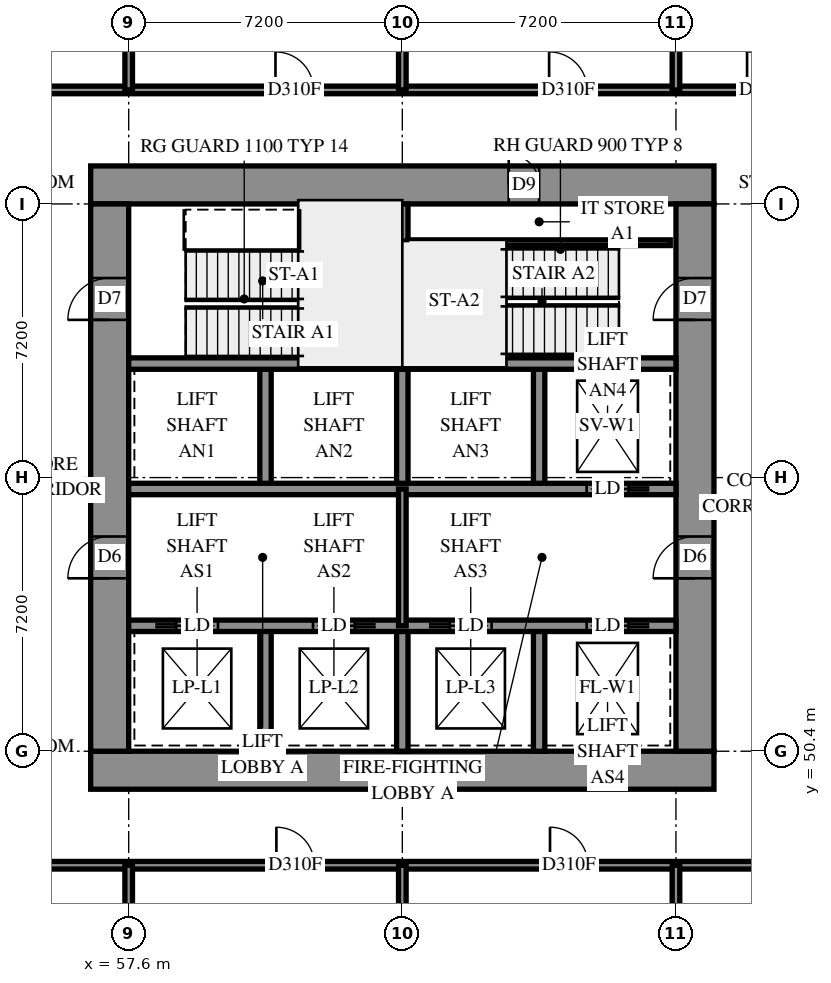
"""IFC4 building model, lengths in metres.
Left out: names, types, materials, properties, quantities, classifications, styles, units other than length and angle.
Written with IfcOpenShell. Run it as: python <this file> out.ifc"""

import sys

from ifc_helpers import new_model, si_unit, direction, frame, frame_2d, origin, place, context, subcontext, project, spatial, rectangle, extrude, element, fill, save


model = new_model("IFC4")
c1 = context("Model", 3, precision=1e-05, world=origin(), true_north=direction((0.0, 1.0)))
c2 = subcontext(c1, "Body", "Model", "MODEL_VIEW")
j1 = project(units=[si_unit("LENGTHUNIT", "METRE"), si_unit("PLANEANGLEUNIT", "RADIAN")], contexts=[c1])
p1 = place(None, origin())
s1 = spatial("IfcSite", under=j1, at=p1, CompositionType="ELEMENT")
p2 = place(p1, origin())
s2 = spatial("IfcBuilding", under=s1, at=p2, CompositionType="ELEMENT")
p3 = place(p2, frame((0.0, 0.0, 22.8)))
s3 = spatial("IfcBuildingStorey", under=s2, at=p3, CompositionType="ELEMENT", Elevation=22.8)
p4 = place(p3, frame((56.6, 49.9, -0.4), z_axis=(0.0, 0.0, 1.0), x_axis=(1.0, 0.0, 0.0)))
e1 = element("IfcWall", 1, at=p4, inside=s3, PredefinedType="SHEAR", context=c2, shape_type="SweptSolid", body=[
    extrude(rectangle(XDim=16.4, YDim=1.0, at=frame_2d((8.2, 0.0))), origin(), (0.0, 0.0, 1.0), 3.6),
])
p5 = place(p3, frame((56.6, 65.3, -0.4), z_axis=(0.0, 0.0, 1.0), x_axis=(1.0, 0.0, 0.0)))
e2 = element("IfcWall", 2, at=p5, inside=s3, PredefinedType="SHEAR", context=c2, shape_type="SweptSolid", body=[
    extrude(rectangle(XDim=16.4, YDim=1.0, at=frame_2d((8.2, 0.0))), origin(), (0.0, 0.0, 1.0), 3.6),
])
p6 = place(p5, frame((11.0, 0.0, 0.4)))
e3 = element("IfcOpeningElement", 3, at=p6, cuts=e2, PredefinedType="OPENING", context=c2, shape_type="SweptSolid", body=[
    extrude(rectangle(XDim=0.8, YDim=2.1, at=frame_2d((0.4, 1.05))), frame((0.0, 0.51, 0.0), z_axis=(0.0, -1.0, 0.0), x_axis=(1.0, 0.0, 0.0)), (0.0, 0.0, 1.0), 1.02),
])
p7 = place(p3, frame((57.1, 50.4, -0.4), z_axis=(0.0, 0.0, 1.0), x_axis=(0.0, 1.0, 0.0)))
e4 = element("IfcWall", 4, at=p7, inside=s3, PredefinedType="SHEAR", context=c2, shape_type="SweptSolid", body=[
    extrude(rectangle(XDim=14.4, YDim=1.0, at=frame_2d((7.2, 0.0))), origin(), (0.0, 0.0, 1.0), 3.6),
])
p8 = place(p7, frame((4.55, 0.0, 0.4)))
e5 = element("IfcOpeningElement", 5, at=p8, cuts=e4, PredefinedType="OPENING", context=c2, shape_type="SweptSolid", body=[
    extrude(rectangle(XDim=1.1, YDim=2.1, at=frame_2d((0.55, 1.05))), frame((0.0, 0.51, 0.0), z_axis=(0.0, -1.0, 0.0), x_axis=(1.0, 0.0, 0.0)), (0.0, 0.0, 1.0), 1.02),
])
p9 = place(p7, frame((11.35, 0.0, 0.4)))
e6 = element("IfcOpeningElement", 6, at=p9, cuts=e4, PredefinedType="OPENING", context=c2, shape_type="SweptSolid", body=[
    extrude(rectangle(XDim=1.1, YDim=2.1, at=frame_2d((0.55, 1.05))), frame((0.0, 0.51, 0.0), z_axis=(0.0, -1.0, 0.0), x_axis=(1.0, 0.0, 0.0)), (0.0, 0.0, 1.0), 1.02),
])
p10 = place(p3, frame((72.5, 50.4, -0.4), z_axis=(0.0, 0.0, 1.0), x_axis=(0.0, 1.0, 0.0)))
e7 = element("IfcWall", 7, at=p10, inside=s3, PredefinedType="SHEAR", context=c2, shape_type="SweptSolid", body=[
    extrude(rectangle(XDim=14.4, YDim=1.0, at=frame_2d((7.2, 0.0))), origin(), (0.0, 0.0, 1.0), 3.6),
])
p11 = place(p10, frame((4.55, 0.0, 0.4)))
e8 = element("IfcOpeningElement", 8, at=p11, cuts=e7, PredefinedType="OPENING", context=c2, shape_type="SweptSolid", body=[
    extrude(rectangle(XDim=1.1, YDim=2.1, at=frame_2d((0.55, 1.05))), frame((0.0, 0.51, 0.0), z_axis=(0.0, -1.0, 0.0), x_axis=(1.0, 0.0, 0.0)), (0.0, 0.0, 1.0), 1.02),
])
p12 = place(p10, frame((11.35, 0.0, 0.4)))
e9 = element("IfcOpeningElement", 9, at=p12, cuts=e7, PredefinedType="OPENING", context=c2, shape_type="SweptSolid", body=[
    extrude(rectangle(XDim=1.1, YDim=2.1, at=frame_2d((0.55, 1.05))), frame((0.0, 0.51, 0.0), z_axis=(0.0, -1.0, 0.0), x_axis=(1.0, 0.0, 0.0)), (0.0, 0.0, 1.0), 1.02),
])
for number, where, z_axis, x_axis in (
    (10, (61.2, 50.4, 0.0), (0.0, 0.0, 1.0), (0.0, 1.0, 0.0)),
    (11, (61.2, 57.3, 0.0), (0.0, 0.0, 1.0), (0.0, 1.0, 0.0)),
    (12, (64.8, 50.4, 0.0), (0.0, 0.0, 1.0), (0.0, 1.0, 0.0)),
    (13, (64.8, 57.3, 0.0), (0.0, 0.0, 1.0), (0.0, 1.0, 0.0)),
    (14, (68.4, 50.4, 0.0), (0.0, 0.0, 1.0), (0.0, 1.0, 0.0)),
    (15, (68.4, 57.3, 0.0), (0.0, 0.0, 1.0), (0.0, 1.0, 0.0)),
):
    element("IfcWall", number, at=place(p3, frame(where, z_axis=z_axis, x_axis=x_axis)), inside=s3, PredefinedType="SOLIDWALL", context=c2, shape_type="SweptSolid", body=[
        extrude(rectangle(XDim=3.3, YDim=0.3, at=frame_2d((1.65, 0.0))), origin(), (0.0, 0.0, 1.0), 3.9),
    ])
p13 = place(p3, frame((57.6, 53.7, 0.0), z_axis=(0.0, 0.0, 1.0), x_axis=(1.0, 0.0, 0.0)))
e16 = element("IfcWall", 16, at=p13, inside=s3, PredefinedType="SOLIDWALL", context=c2, shape_type="SweptSolid", body=[
    extrude(rectangle(XDim=14.4, YDim=0.3, at=frame_2d((7.2, 0.0))), origin(), (0.0, 0.0, 1.0), 3.9),
])
p14 = place(p13, frame((1.25, 0.0, 0.0)))
e17 = element("IfcOpeningElement", 17, at=p14, cuts=e16, PredefinedType="OPENING", context=c2, shape_type="SweptSolid", body=[
    extrude(rectangle(XDim=1.1, YDim=2.1, at=frame_2d((0.55, 1.05))), frame((0.0, 0.16, 0.0), z_axis=(0.0, -1.0, 0.0), x_axis=(1.0, 0.0, 0.0)), (0.0, 0.0, 1.0), 0.32),
])
p15 = place(p13, frame((4.85, 0.0, 0.0)))
e18 = element("IfcOpeningElement", 18, at=p15, cuts=e16, PredefinedType="OPENING", context=c2, shape_type="SweptSolid", body=[
    extrude(rectangle(XDim=1.1, YDim=2.1, at=frame_2d((0.55, 1.05))), frame((0.0, 0.16, 0.0), z_axis=(0.0, -1.0, 0.0), x_axis=(1.0, 0.0, 0.0)), (0.0, 0.0, 1.0), 0.32),
])
p16 = place(p13, frame((8.45, 0.0, 0.0)))
e19 = element("IfcOpeningElement", 19, at=p16, cuts=e16, PredefinedType="OPENING", context=c2, shape_type="SweptSolid", body=[
    extrude(rectangle(XDim=1.1, YDim=2.1, at=frame_2d((0.55, 1.05))), frame((0.0, 0.16, 0.0), z_axis=(0.0, -1.0, 0.0), x_axis=(1.0, 0.0, 0.0)), (0.0, 0.0, 1.0), 0.32),
])
p17 = place(p13, frame((12.05, 0.0, 0.0)))
e20 = element("IfcOpeningElement", 20, at=p17, cuts=e16, PredefinedType="OPENING", context=c2, shape_type="SweptSolid", body=[
    extrude(rectangle(XDim=1.1, YDim=2.1, at=frame_2d((0.55, 1.05))), frame((0.0, 0.16, 0.0), z_axis=(0.0, -1.0, 0.0), x_axis=(1.0, 0.0, 0.0)), (0.0, 0.0, 1.0), 0.32),
])
p18 = place(p3, frame((57.6, 57.3, 0.0), z_axis=(0.0, 0.0, 1.0), x_axis=(1.0, 0.0, 0.0)))
e21 = element("IfcWall", 21, at=p18, inside=s3, PredefinedType="SOLIDWALL", context=c2, shape_type="SweptSolid", body=[
    extrude(rectangle(XDim=14.4, YDim=0.3, at=frame_2d((7.2, 0.0))), origin(), (0.0, 0.0, 1.0), 3.9),
])
p19 = place(p18, frame((12.05, 0.0, 0.0)))
e22 = element("IfcOpeningElement", 22, at=p19, cuts=e21, PredefinedType="OPENING", context=c2, shape_type="SweptSolid", body=[
    extrude(rectangle(XDim=1.1, YDim=2.1, at=frame_2d((0.55, 1.05))), frame((0.0, 0.16, 0.0), z_axis=(0.0, -1.0, 0.0), x_axis=(1.0, 0.0, 0.0)), (0.0, 0.0, 1.0), 0.32),
])
for number, where, z_axis, x_axis in (
    (23, (57.6, 60.6, 0.0), (0.0, 0.0, 1.0), (1.0, 0.0, 0.0)),
    (24, (64.8, 60.6, 0.0), (0.0, 0.0, 1.0), (1.0, 0.0, 0.0)),
):
    element("IfcWall", number, at=place(p3, frame(where, z_axis=z_axis, x_axis=x_axis)), inside=s3, PredefinedType="SOLIDWALL", context=c2, shape_type="SweptSolid", body=[
        extrude(rectangle(XDim=7.2, YDim=0.3, at=frame_2d((3.6, 0.0))), origin(), (0.0, 0.0, 1.0), 3.9),
    ])
p20 = place(p3, frame((64.8, 60.6, 0.0), z_axis=(0.0, 0.0, 1.0), x_axis=(0.0, 1.0, 0.0)))
e25 = element("IfcWall", 25, at=p20, inside=s3, PredefinedType="SOLIDWALL", context=c2, shape_type="SweptSolid", body=[
    extrude(rectangle(XDim=4.2, YDim=0.3, at=frame_2d((2.1, 0.0))), origin(), (0.0, 0.0, 1.0), 3.9),
])
p21 = place(p3, frame((64.95, 63.78, 0.0), z_axis=(0.0, 0.0, 1.0), x_axis=(1.0, 0.0, 0.0)))
e26 = element("IfcWall", 26, at=p21, inside=s3, PredefinedType="PARTITIONING", context=c2, shape_type="SweptSolid", body=[
    extrude(rectangle(XDim=6.9, YDim=0.15, at=frame_2d((3.45, 0.0))), origin(), (0.0, 0.0, 1.0), 3.9),
])
p22 = place(p3, frame((64.8, 53.7, 0.0), z_axis=(0.0, 0.0, 1.0), x_axis=(0.0, 1.0, 0.0)))
e27 = element("IfcWall", 27, at=p22, inside=s3, PredefinedType="PARTITIONING", context=c2, shape_type="SweptSolid", body=[
    extrude(rectangle(XDim=3.6, YDim=0.2, at=frame_2d((1.8, 0.0))), origin(), (0.0, 0.0, 1.0), 3.9),
])
p23 = place(p3, frame((54.6, 67.8, 0.0), z_axis=(0.0, 0.0, 1.0), x_axis=(1.0, 0.0, 0.0)))
e28 = element("IfcWall", 28, at=p23, inside=s3, PredefinedType="PARTITIONING", context=c2, shape_type="SweptSolid", body=[
    extrude(rectangle(XDim=20.4, YDim=0.2, at=frame_2d((10.2, 0.0))), origin(), (0.0, 0.0, 1.0), 3.9),
])
p24 = place(p23, frame((19.271, 0.0, 0.0)))
e29 = element("IfcOpeningElement", 29, at=p24, cuts=e28, PredefinedType="OPENING", context=c2, shape_type="SweptSolid", body=[
    extrude(rectangle(XDim=1.0, YDim=2.1, at=frame_2d((0.5, 1.05))), frame((0.0, 0.11, 0.0), z_axis=(0.0, -1.0, 0.0), x_axis=(1.0, 0.0, 0.0)), (0.0, 0.0, 1.0), 0.22),
])
p25 = place(p23, frame((6.862, 0.0, 0.0)))
e30 = element("IfcOpeningElement", 30, at=p25, cuts=e28, PredefinedType="OPENING", context=c2, shape_type="SweptSolid", body=[
    extrude(rectangle(XDim=1.0, YDim=2.1, at=frame_2d((0.5, 1.05))), frame((0.0, 0.11, 0.0), z_axis=(0.0, -1.0, 0.0), x_axis=(1.0, 0.0, 0.0)), (0.0, 0.0, 1.0), 0.22),
])
p26 = place(p23, frame((14.062, 0.0, 0.0)))
e31 = element("IfcOpeningElement", 31, at=p26, cuts=e28, PredefinedType="OPENING", context=c2, shape_type="SweptSolid", body=[
    extrude(rectangle(XDim=1.0, YDim=2.1, at=frame_2d((0.5, 1.05))), frame((0.0, 0.11, 0.0), z_axis=(0.0, -1.0, 0.0), x_axis=(1.0, 0.0, 0.0)), (0.0, 0.0, 1.0), 0.22),
])
p27 = place(p3, frame((54.6, 47.4, 0.0), z_axis=(0.0, 0.0, 1.0), x_axis=(1.0, 0.0, 0.0)))
e32 = element("IfcWall", 32, at=p27, inside=s3, PredefinedType="PARTITIONING", context=c2, shape_type="SweptSolid", body=[
    extrude(rectangle(XDim=19.502, YDim=0.2, at=frame_2d((9.751, 0.0))), origin(), (0.0, 0.0, 1.0), 3.9),
])
p28 = place(p27, frame((6.886, 0.0, 0.0)))
e33 = element("IfcOpeningElement", 33, at=p28, cuts=e32, PredefinedType="OPENING", context=c2, shape_type="SweptSolid", body=[
    extrude(rectangle(XDim=1.0, YDim=2.1, at=frame_2d((0.5, 1.05))), frame((0.0, 0.11, 0.0), z_axis=(0.0, -1.0, 0.0), x_axis=(1.0, 0.0, 0.0)), (0.0, 0.0, 1.0), 0.22),
])
p29 = place(p27, frame((14.086, 0.0, 0.0)))
e34 = element("IfcOpeningElement", 34, at=p29, cuts=e32, PredefinedType="OPENING", context=c2, shape_type="SweptSolid", body=[
    extrude(rectangle(XDim=1.0, YDim=2.1, at=frame_2d((0.5, 1.05))), frame((0.0, 0.11, 0.0), z_axis=(0.0, -1.0, 0.0), x_axis=(1.0, 0.0, 0.0)), (0.0, 0.0, 1.0), 0.22),
])
for number, where, z_axis, x_axis in (
    (35, (57.6, 67.8, 0.0), (0.0, 0.0, 1.0), (0.0, 1.0, 0.0)),
    (36, (64.8, 67.8, 0.0), (0.0, 0.0, 1.0), (0.0, 1.0, 0.0)),
    (37, (72.0, 67.8, 0.0), (0.0, 0.0, 1.0), (0.0, 1.0, 0.0)),
    (38, (57.6, 43.8, 0.0), (0.0, 0.0, 1.0), (0.0, 1.0, 0.0)),
    (39, (64.8, 43.8, 0.0), (0.0, 0.0, 1.0), (0.0, 1.0, 0.0)),
    (40, (72.0, 43.8, 0.0), (0.0, 0.0, 1.0), (0.0, 1.0, 0.0)),
):
    element("IfcWall", number, at=place(p3, frame(where, z_axis=z_axis, x_axis=x_axis)), inside=s3, PredefinedType="PARTITIONING", context=c2, shape_type="SweptSolid", body=[
        extrude(rectangle(XDim=3.6, YDim=0.2, at=frame_2d((1.8, 0.0))), origin(), (0.0, 0.0, 1.0), 3.9),
    ])
p30 = place(p6, origin())
e41 = element("IfcDoor", 41, at=p30, inside=s3, OperationType="SINGLE_SWING_RIGHT", PredefinedType="DOOR", context=c2, shape_type="SweptSolid", body=[
    extrude(rectangle(XDim=0.8, YDim=2.1, at=frame_2d((0.4, 1.05))), frame((0.0, -0.44, 0.0), z_axis=(0.0, -1.0, 0.0), x_axis=(1.0, 0.0, 0.0)), (0.0, 0.0, 1.0), 0.05),
])
fill(e3, e41)
p31 = place(p8, origin())
e42 = element("IfcDoor", 42, at=p31, inside=s3, OperationType="DOUBLE_DOOR_SINGLE_SWING", PredefinedType="DOOR", context=c2, shape_type="SweptSolid", body=[
    extrude(rectangle(XDim=1.1, YDim=2.1, at=frame_2d((0.55, 1.05))), frame((0.0, 0.025, 0.0), z_axis=(0.0, -1.0, 0.0), x_axis=(1.0, 0.0, 0.0)), (0.0, 0.0, 1.0), 0.05),
])
fill(e5, e42)
p32 = place(p11, origin())
e43 = element("IfcDoor", 43, at=p32, inside=s3, OperationType="DOUBLE_DOOR_SINGLE_SWING", PredefinedType="DOOR", context=c2, shape_type="SweptSolid", body=[
    extrude(rectangle(XDim=1.1, YDim=2.1, at=frame_2d((0.55, 1.05))), frame((0.0, 0.025, 0.0), z_axis=(0.0, -1.0, 0.0), x_axis=(1.0, 0.0, 0.0)), (0.0, 0.0, 1.0), 0.05),
])
fill(e8, e43)
p33 = place(p9, origin())
e44 = element("IfcDoor", 44, at=p33, inside=s3, OperationType="SINGLE_SWING_LEFT", PredefinedType="DOOR", context=c2, shape_type="SweptSolid", body=[
    extrude(rectangle(XDim=1.1, YDim=2.1, at=frame_2d((0.55, 1.05))), frame((0.0, 0.025, 0.0), z_axis=(0.0, -1.0, 0.0), x_axis=(1.0, 0.0, 0.0)), (0.0, 0.0, 1.0), 0.05),
])
fill(e6, e44)
p34 = place(p12, origin())
e45 = element("IfcDoor", 45, at=p34, inside=s3, OperationType="SINGLE_SWING_RIGHT", PredefinedType="DOOR", context=c2, shape_type="SweptSolid", body=[
    extrude(rectangle(XDim=1.1, YDim=2.1, at=frame_2d((0.55, 1.05))), frame((0.0, 0.025, 0.0), z_axis=(0.0, -1.0, 0.0), x_axis=(1.0, 0.0, 0.0)), (0.0, 0.0, 1.0), 0.05),
])
fill(e9, e45)
p35 = place(p14, origin())
e46 = element("IfcDoor", 46, at=p35, inside=s3, OperationType="SLIDING_TO_LEFT", PredefinedType="DOOR", context=c2, shape_type="SweptSolid", body=[
    extrude(rectangle(XDim=1.1, YDim=2.1, at=frame_2d((0.55, 1.05))), frame((0.0, 0.025, 0.0), z_axis=(0.0, -1.0, 0.0), x_axis=(1.0, 0.0, 0.0)), (0.0, 0.0, 1.0), 0.05),
])
fill(e17, e46)
p36 = place(p15, origin())
e47 = element("IfcDoor", 47, at=p36, inside=s3, OperationType="SLIDING_TO_RIGHT", PredefinedType="DOOR", context=c2, shape_type="SweptSolid", body=[
    extrude(rectangle(XDim=1.1, YDim=2.1, at=frame_2d((0.55, 1.05))), frame((0.0, 0.025, 0.0), z_axis=(0.0, -1.0, 0.0), x_axis=(1.0, 0.0, 0.0)), (0.0, 0.0, 1.0), 0.05),
])
fill(e18, e47)
p37 = place(p16, origin())
e48 = element("IfcDoor", 48, at=p37, inside=s3, OperationType="SLIDING_TO_LEFT", PredefinedType="DOOR", context=c2, shape_type="SweptSolid", body=[
    extrude(rectangle(XDim=1.1, YDim=2.1, at=frame_2d((0.55, 1.05))), frame((0.0, 0.025, 0.0), z_axis=(0.0, -1.0, 0.0), x_axis=(1.0, 0.0, 0.0)), (0.0, 0.0, 1.0), 0.05),
])
fill(e19, e48)
p38 = place(p17, origin())
e49 = element("IfcDoor", 49, at=p38, inside=s3, OperationType="SLIDING_TO_RIGHT", PredefinedType="DOOR", context=c2, shape_type="SweptSolid", body=[
    extrude(rectangle(XDim=1.1, YDim=2.1, at=frame_2d((0.55, 1.05))), frame((0.0, 0.025, 0.0), z_axis=(0.0, -1.0, 0.0), x_axis=(1.0, 0.0, 0.0)), (0.0, 0.0, 1.0), 0.05),
])
fill(e20, e49)
p39 = place(p19, origin())
e50 = element("IfcDoor", 50, at=p39, inside=s3, OperationType="SLIDING_TO_RIGHT", PredefinedType="DOOR", context=c2, shape_type="SweptSolid", body=[
    extrude(rectangle(XDim=1.1, YDim=2.1, at=frame_2d((0.55, 1.05))), frame((0.0, 0.025, 0.0), z_axis=(0.0, -1.0, 0.0), x_axis=(1.0, 0.0, 0.0)), (0.0, 0.0, 1.0), 0.05),
])
fill(e22, e50)
p40 = place(p28, origin())
e51 = element("IfcDoor", 51, at=p40, inside=s3, OperationType="SINGLE_SWING_LEFT", PredefinedType="DOOR", context=c2, shape_type="SweptSolid", body=[
    extrude(rectangle(XDim=1.0, YDim=2.1, at=frame_2d((0.5, 1.05))), frame((0.0, 0.025, 0.0), z_axis=(0.0, -1.0, 0.0), x_axis=(1.0, 0.0, 0.0)), (0.0, 0.0, 1.0), 0.05),
])
fill(e33, e51)
p41 = place(p29, origin())
e52 = element("IfcDoor", 52, at=p41, inside=s3, OperationType="SINGLE_SWING_LEFT", PredefinedType="DOOR", context=c2, shape_type="SweptSolid", body=[
    extrude(rectangle(XDim=1.0, YDim=2.1, at=frame_2d((0.5, 1.05))), frame((0.0, 0.025, 0.0), z_axis=(0.0, -1.0, 0.0), x_axis=(1.0, 0.0, 0.0)), (0.0, 0.0, 1.0), 0.05),
])
fill(e34, e52)
p42 = place(p24, origin())
e53 = element("IfcDoor", 53, at=p42, inside=s3, OperationType="SINGLE_SWING_RIGHT", PredefinedType="DOOR", context=c2, shape_type="SweptSolid", body=[
    extrude(rectangle(XDim=1.0, YDim=2.1, at=frame_2d((0.5, 1.05))), frame((0.0, 0.025, 0.0), z_axis=(0.0, -1.0, 0.0), x_axis=(1.0, 0.0, 0.0)), (0.0, 0.0, 1.0), 0.05),
])
fill(e29, e53)
p43 = place(p25, origin())
e54 = element("IfcDoor", 54, at=p43, inside=s3, OperationType="SINGLE_SWING_RIGHT", PredefinedType="DOOR", context=c2, shape_type="SweptSolid", body=[
    extrude(rectangle(XDim=1.0, YDim=2.1, at=frame_2d((0.5, 1.05))), frame((0.0, 0.025, 0.0), z_axis=(0.0, -1.0, 0.0), x_axis=(1.0, 0.0, 0.0)), (0.0, 0.0, 1.0), 0.05),
])
fill(e30, e54)
p44 = place(p26, origin())
e55 = element("IfcDoor", 55, at=p44, inside=s3, OperationType="SINGLE_SWING_RIGHT", PredefinedType="DOOR", context=c2, shape_type="SweptSolid", body=[
    extrude(rectangle(XDim=1.0, YDim=2.1, at=frame_2d((0.5, 1.05))), frame((0.0, 0.025, 0.0), z_axis=(0.0, -1.0, 0.0), x_axis=(1.0, 0.0, 0.0)), (0.0, 0.0, 1.0), 0.05),
])
fill(e31, e55)
save(model, sys.argv[1])
